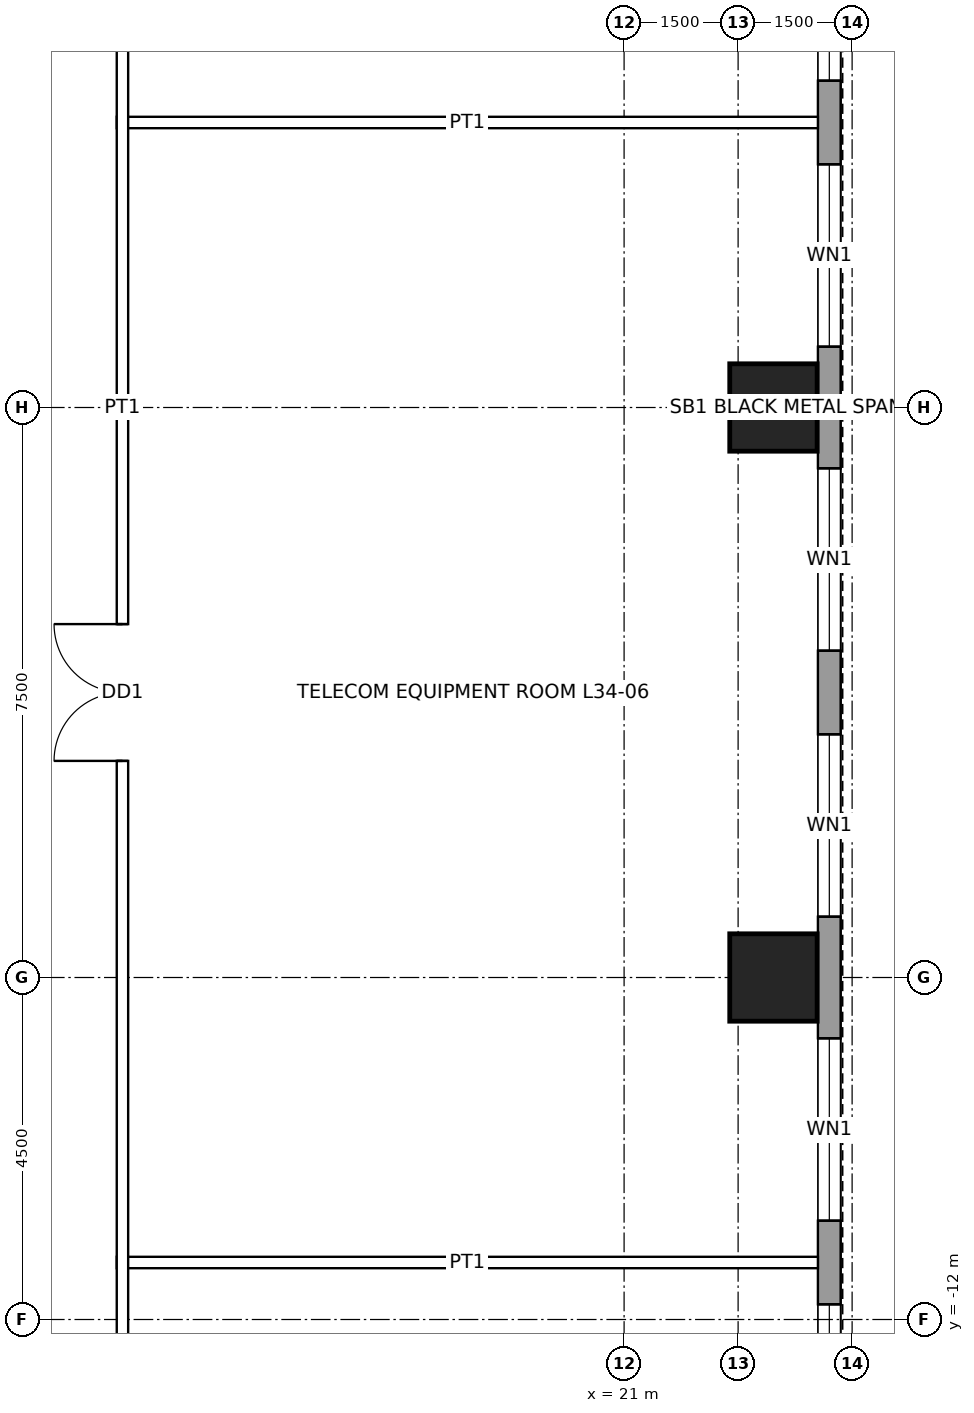
"""IFC4 building model, lengths in metres.
Left out: names, types, materials, properties, quantities, classifications, styles, units other than length and angle.
Written with IfcOpenShell. Run it as: python <this file> out.ifc"""

import sys

from ifc_helpers import new_model, si_unit, direction, frame, frame_2d, origin, origin_2d, place, context, subcontext, project, spatial, rectangle, hollow_rectangle, extrude, element, fill, save


model = new_model("IFC4")
c1 = context("Model", 3, precision=1e-05, world=origin(), true_north=direction((0.0, 1.0)))
c2 = subcontext(c1, "Body", "Model", "MODEL_VIEW")
j1 = project(units=[si_unit("LENGTHUNIT", "METRE"), si_unit("PLANEANGLEUNIT", "RADIAN")], contexts=[c1])
p1 = place(None, origin())
s1 = spatial("IfcSite", under=j1, at=p1, CompositionType="ELEMENT")
p2 = place(p1, origin())
s2 = spatial("IfcBuilding", under=s1, at=p2, CompositionType="ELEMENT")
p3 = place(p2, frame((0.0, 0.0, 167.4)))
s3 = spatial("IfcBuildingStorey", under=s2, at=p3, CompositionType="ELEMENT", Elevation=167.4)
for number, where, z_axis, x_axis in (
    (1, (22.965, 0.0, 0.0), (0.0, 0.0, 1.0), (1.0, 0.0, 0.0)),
    (2, (22.965, -7.5, 0.0), (0.0, 0.0, 1.0), (1.0, 0.0, 0.0)),
):
    element("IfcColumn", number, at=place(p3, frame(where, z_axis=z_axis, x_axis=x_axis)), inside=s3, PredefinedType="COLUMN", context=c2, shape_type="SweptSolid", body=[
        extrude(hollow_rectangle(XDim=1.15, YDim=1.15, WallThickness=0.075, at=origin_2d()), origin(), (0.0, 0.0, 1.0), 4.5),
    ])
p4 = place(p3, frame((23.7, 16.2, 0.0), z_axis=(0.0, 0.0, 1.0), x_axis=(0.0, -1.0, 0.0)))
e3 = element("IfcWall", 3, at=p4, inside=s3, PredefinedType="SOLIDWALL", context=c2, shape_type="SweptSolid", body=[
    extrude(rectangle(XDim=32.4, YDim=0.3, at=frame_2d((16.2, 0.0))), origin(), (0.0, 0.0, 1.0), 4.25),
])
p5 = place(p4, frame((2.0, 0.0, 1.0)))
e4 = element("IfcOpeningElement", 4, at=p5, cuts=e3, PredefinedType="OPENING", context=c2, shape_type="SweptSolid", body=[
    extrude(rectangle(XDim=2.4, YDim=1.2, at=frame_2d((1.2, 0.6))), frame((0.0, 0.16, 0.0), z_axis=(0.0, -1.0, 0.0), x_axis=(1.0, 0.0, 0.0)), (0.0, 0.0, 1.0), 0.32),
])
p6 = place(p4, frame((5.5, 0.0, 1.0)))
e5 = element("IfcOpeningElement", 5, at=p6, cuts=e3, PredefinedType="OPENING", context=c2, shape_type="SweptSolid", body=[
    extrude(rectangle(XDim=2.4, YDim=1.2, at=frame_2d((1.2, 0.6))), frame((0.0, 0.16, 0.0), z_axis=(0.0, -1.0, 0.0), x_axis=(1.0, 0.0, 0.0)), (0.0, 0.0, 1.0), 0.32),
])
p7 = place(p4, frame((9.5, 0.0, 1.0)))
e6 = element("IfcOpeningElement", 6, at=p7, cuts=e3, PredefinedType="OPENING", context=c2, shape_type="SweptSolid", body=[
    extrude(rectangle(XDim=2.4, YDim=1.2, at=frame_2d((1.2, 0.6))), frame((0.0, 0.16, 0.0), z_axis=(0.0, -1.0, 0.0), x_axis=(1.0, 0.0, 0.0)), (0.0, 0.0, 1.0), 0.32),
])
p8 = place(p4, frame((13.0, 0.0, 1.0)))
e7 = element("IfcOpeningElement", 7, at=p8, cuts=e3, PredefinedType="OPENING", context=c2, shape_type="SweptSolid", body=[
    extrude(rectangle(XDim=2.4, YDim=1.2, at=frame_2d((1.2, 0.6))), frame((0.0, 0.16, 0.0), z_axis=(0.0, -1.0, 0.0), x_axis=(1.0, 0.0, 0.0)), (0.0, 0.0, 1.0), 0.32),
])
p9 = place(p4, frame((17.0, 0.0, 1.0)))
e8 = element("IfcOpeningElement", 8, at=p9, cuts=e3, PredefinedType="OPENING", context=c2, shape_type="SweptSolid", body=[
    extrude(rectangle(XDim=2.4, YDim=1.2, at=frame_2d((1.2, 0.6))), frame((0.0, 0.16, 0.0), z_axis=(0.0, -1.0, 0.0), x_axis=(1.0, 0.0, 0.0)), (0.0, 0.0, 1.0), 0.32),
])
p10 = place(p4, frame((20.5, 0.0, 1.0)))
e9 = element("IfcOpeningElement", 9, at=p10, cuts=e3, PredefinedType="OPENING", context=c2, shape_type="SweptSolid", body=[
    extrude(rectangle(XDim=2.4, YDim=1.2, at=frame_2d((1.2, 0.6))), frame((0.0, 0.16, 0.0), z_axis=(0.0, -1.0, 0.0), x_axis=(1.0, 0.0, 0.0)), (0.0, 0.0, 1.0), 0.32),
])
p11 = place(p4, frame((24.5, 0.0, 1.0)))
e10 = element("IfcOpeningElement", 10, at=p11, cuts=e3, PredefinedType="OPENING", context=c2, shape_type="SweptSolid", body=[
    extrude(rectangle(XDim=2.4, YDim=1.2, at=frame_2d((1.2, 0.6))), frame((0.0, 0.16, 0.0), z_axis=(0.0, -1.0, 0.0), x_axis=(1.0, 0.0, 0.0)), (0.0, 0.0, 1.0), 0.32),
])
p12 = place(p4, frame((28.0, 0.0, 1.0)))
e11 = element("IfcOpeningElement", 11, at=p12, cuts=e3, PredefinedType="OPENING", context=c2, shape_type="SweptSolid", body=[
    extrude(rectangle(XDim=2.4, YDim=1.2, at=frame_2d((1.2, 0.6))), frame((0.0, 0.16, 0.0), z_axis=(0.0, -1.0, 0.0), x_axis=(1.0, 0.0, 0.0)), (0.0, 0.0, 1.0), 0.32),
])
for number, where, z_axis, x_axis in (
    (12, (14.325, -11.25, 0.0), (0.0, 0.0, 1.0), (1.0, 0.0, 0.0)),
    (13, (14.325, 3.75, 0.0), (0.0, 0.0, 1.0), (1.0, 0.0, 0.0)),
):
    element("IfcWall", number, at=place(p3, frame(where, z_axis=z_axis, x_axis=x_axis)), inside=s3, PredefinedType="PARTITIONING", context=c2, shape_type="SweptSolid", body=[
        extrude(rectangle(XDim=9.225, YDim=0.15, at=frame_2d((4.613, 0.0))), origin(), (0.0, 0.0, 1.0), 3.409),
    ])
p13 = place(p3, frame((14.4, -14.475, 0.0), z_axis=(0.0, 0.0, 1.0), x_axis=(0.0, 1.0, 0.0)))
e14 = element("IfcWall", 14, at=p13, inside=s3, PredefinedType="PARTITIONING", context=c2, shape_type="SweptSolid", body=[
    extrude(rectangle(XDim=28.95, YDim=0.15, at=frame_2d((14.475, 0.0))), origin(), (0.0, 0.0, 1.0), 4.25),
])
p14 = place(p13, frame((21.075, 0.0, 0.0)))
e15 = element("IfcOpeningElement", 15, at=p14, cuts=e14, PredefinedType="OPENING", context=c2, shape_type="SweptSolid", body=[
    extrude(rectangle(XDim=1.8, YDim=2.4, at=frame_2d((0.9, 1.2))), frame((0.0, 0.085, 0.0), z_axis=(0.0, -1.0, 0.0), x_axis=(1.0, 0.0, 0.0)), (0.0, 0.0, 1.0), 0.17),
])
p15 = place(p13, frame((9.825, 0.0, 0.0)))
e16 = element("IfcOpeningElement", 16, at=p15, cuts=e14, PredefinedType="OPENING", context=c2, shape_type="SweptSolid", body=[
    extrude(rectangle(XDim=1.8, YDim=2.4, at=frame_2d((0.9, 1.2))), frame((0.0, 0.085, 0.0), z_axis=(0.0, -1.0, 0.0), x_axis=(1.0, 0.0, 0.0)), (0.0, 0.0, 1.0), 0.17),
])
p16 = place(p7, origin())
e17 = element("IfcWindow", 17, at=p16, inside=s3, PartitioningType="SINGLE_PANEL", PredefinedType="WINDOW", context=c2, shape_type="SweptSolid", body=[
    extrude(rectangle(XDim=2.4, YDim=1.2, at=frame_2d((1.2, 0.6))), frame((0.0, 0.03, 0.0), z_axis=(0.0, -1.0, 0.0), x_axis=(1.0, 0.0, 0.0)), (0.0, 0.0, 1.0), 0.06),
])
fill(e6, e17)
p17 = place(p8, origin())
e18 = element("IfcWindow", 18, at=p17, inside=s3, PartitioningType="SINGLE_PANEL", PredefinedType="WINDOW", context=c2, shape_type="SweptSolid", body=[
    extrude(rectangle(XDim=2.4, YDim=1.2, at=frame_2d((1.2, 0.6))), frame((0.0, 0.03, 0.0), z_axis=(0.0, -1.0, 0.0), x_axis=(1.0, 0.0, 0.0)), (0.0, 0.0, 1.0), 0.06),
])
fill(e7, e18)
p18 = place(p9, origin())
e19 = element("IfcWindow", 19, at=p18, inside=s3, PartitioningType="SINGLE_PANEL", PredefinedType="WINDOW", context=c2, shape_type="SweptSolid", body=[
    extrude(rectangle(XDim=2.4, YDim=1.2, at=frame_2d((1.2, 0.6))), frame((0.0, 0.03, 0.0), z_axis=(0.0, -1.0, 0.0), x_axis=(1.0, 0.0, 0.0)), (0.0, 0.0, 1.0), 0.06),
])
fill(e8, e19)
p19 = place(p10, origin())
e20 = element("IfcWindow", 20, at=p19, inside=s3, PartitioningType="SINGLE_PANEL", PredefinedType="WINDOW", context=c2, shape_type="SweptSolid", body=[
    extrude(rectangle(XDim=2.4, YDim=1.2, at=frame_2d((1.2, 0.6))), frame((0.0, 0.03, 0.0), z_axis=(0.0, -1.0, 0.0), x_axis=(1.0, 0.0, 0.0)), (0.0, 0.0, 1.0), 0.06),
])
fill(e9, e20)
p20 = place(p11, origin())
e21 = element("IfcWindow", 21, at=p20, inside=s3, PartitioningType="SINGLE_PANEL", PredefinedType="WINDOW", context=c2, shape_type="SweptSolid", body=[
    extrude(rectangle(XDim=2.4, YDim=1.2, at=frame_2d((1.2, 0.6))), frame((0.0, 0.03, 0.0), z_axis=(0.0, -1.0, 0.0), x_axis=(1.0, 0.0, 0.0)), (0.0, 0.0, 1.0), 0.06),
])
fill(e10, e21)
p21 = place(p12, origin())
e22 = element("IfcWindow", 22, at=p21, inside=s3, PartitioningType="SINGLE_PANEL", PredefinedType="WINDOW", context=c2, shape_type="SweptSolid", body=[
    extrude(rectangle(XDim=2.4, YDim=1.2, at=frame_2d((1.2, 0.6))), frame((0.0, 0.03, 0.0), z_axis=(0.0, -1.0, 0.0), x_axis=(1.0, 0.0, 0.0)), (0.0, 0.0, 1.0), 0.06),
])
fill(e11, e22)
p22 = place(p15, origin())
e23 = element("IfcDoor", 23, at=p22, inside=s3, OperationType="DOUBLE_DOOR_SINGLE_SWING", PredefinedType="DOOR", context=c2, shape_type="SweptSolid", body=[
    extrude(rectangle(XDim=1.8, YDim=2.4, at=frame_2d((0.9, 1.2))), frame((0.0, 0.025, 0.0), z_axis=(0.0, -1.0, 0.0), x_axis=(1.0, 0.0, 0.0)), (0.0, 0.0, 1.0), 0.05),
])
fill(e16, e23)
save(model, sys.argv[1])
